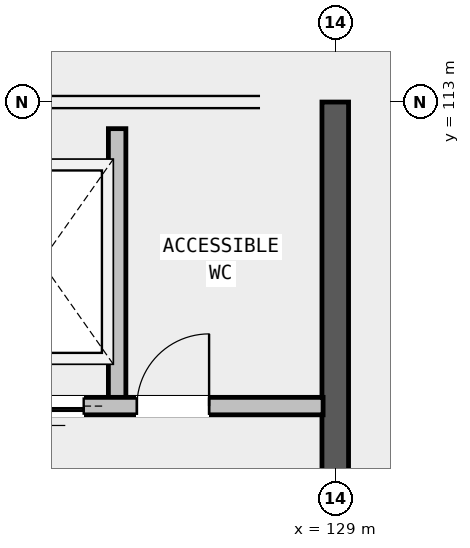
"""IFC4 building model, lengths in metres.
Left out: names, types, materials, properties, quantities, classifications, styles, units other than length and angle.
Written with IfcOpenShell. Run it as: python <this file> out.ifc"""

import sys

from ifc_helpers import new_model, si_unit, direction, frame, frame_2d, origin, place, context, subcontext, project, spatial, rectangle, extrude, element, fill, save


model = new_model("IFC4")
c1 = context("Model", 3, precision=1e-05, world=origin(), true_north=direction((0.0, 1.0)))
c2 = subcontext(c1, "Body", "Model", "MODEL_VIEW")
j1 = project(units=[si_unit("LENGTHUNIT", "METRE"), si_unit("PLANEANGLEUNIT", "RADIAN")], contexts=[c1])
p1 = place(None, origin())
s1 = spatial("IfcSite", under=j1, at=p1, CompositionType="ELEMENT")
p2 = place(p1, origin())
s2 = spatial("IfcBuilding", under=s1, at=p2, CompositionType="ELEMENT")
p3 = place(p2, frame((0.0, 0.0, 25.1)))
s3 = spatial("IfcBuildingStorey", under=s2, at=p3, CompositionType="ELEMENT", Elevation=25.1)
p4 = place(p3, frame((129.0, 104.0, 0.0), z_axis=(0.0, 0.0, 1.0), x_axis=(0.0, 1.0, 0.0)))
e1 = element("IfcWall", 1, at=p4, inside=s3, PredefinedType="SHEAR", context=c2, shape_type="SweptSolid", body=[
    extrude(rectangle(XDim=9.0, YDim=0.35, at=frame_2d((4.5, 0.0))), origin(), (0.0, 0.0, 1.0), 2.38),
])
p5 = place(p4, frame((1.4, 0.0, 0.0)))
e2 = element("IfcOpeningElement", 2, at=p5, cuts=e1, PredefinedType="OPENING", context=c2, shape_type="SweptSolid", body=[
    extrude(rectangle(XDim=1.9, YDim=2.3, at=frame_2d((0.95, 1.15))), frame((0.0, 0.185, 0.0), z_axis=(0.0, -1.0, 0.0), x_axis=(1.0, 0.0, 0.0)), (0.0, 0.0, 1.0), 0.37),
])
p6 = place(p3, frame((126.13, 109.0, 0.0), z_axis=(0.0, 0.0, 1.0), x_axis=(0.0, 1.0, 0.0)))
e3 = element("IfcWall", 3, at=p6, inside=s3, PredefinedType="PARTITIONING", context=c2, shape_type="SweptSolid", body=[
    extrude(rectangle(XDim=3.65, YDim=0.23, at=frame_2d((1.825, 0.0))), origin(), (0.0, 0.0, 1.0), 2.38),
])
p7 = place(p3, frame((124.21, 109.0, 0.0), z_axis=(0.0, 0.0, 1.0), x_axis=(1.0, 0.0, 0.0)))
e4 = element("IfcWall", 4, at=p7, inside=s3, PredefinedType="PARTITIONING", context=c2, shape_type="SweptSolid", body=[
    extrude(rectangle(XDim=4.63, YDim=0.23, at=frame_2d((2.315, 0.0))), origin(), (0.0, 0.0, 1.0), 2.38),
])
p8 = place(p7, frame((0.38, 0.0, 0.0)))
e5 = element("IfcOpeningElement", 5, at=p8, cuts=e4, PredefinedType="OPENING", context=c2, shape_type="SweptSolid", body=[
    extrude(rectangle(XDim=1.1, YDim=2.15, at=frame_2d((0.55, 1.075))), frame((0.0, 0.125, 0.0), z_axis=(0.0, -1.0, 0.0), x_axis=(1.0, 0.0, 0.0)), (0.0, 0.0, 1.0), 0.25),
])
p9 = place(p7, frame((2.18, 0.0, 0.0)))
e6 = element("IfcOpeningElement", 6, at=p9, cuts=e4, PredefinedType="OPENING", context=c2, shape_type="SweptSolid", body=[
    extrude(rectangle(XDim=0.95, YDim=2.1, at=frame_2d((0.475, 1.05))), frame((0.0, 0.125, 0.0), z_axis=(0.0, -1.0, 0.0), x_axis=(1.0, 0.0, 0.0)), (0.0, 0.0, 1.0), 0.25),
])
p10 = place(p8, origin())
e7 = element("IfcDoor", 7, at=p10, inside=s3, OperationType="SLIDING_TO_LEFT", PredefinedType="DOOR", context=c2, shape_type="SweptSolid", body=[
    extrude(rectangle(XDim=1.1, YDim=2.15, at=frame_2d((0.55, 1.075))), frame((0.0, 0.025, 0.0), z_axis=(0.0, -1.0, 0.0), x_axis=(1.0, 0.0, 0.0)), (0.0, 0.0, 1.0), 0.05),
])
fill(e5, e7)
p11 = place(p9, origin())
e8 = element("IfcDoor", 8, at=p11, inside=s3, OperationType="SINGLE_SWING_RIGHT", PredefinedType="DOOR", context=c2, shape_type="SweptSolid", body=[
    extrude(rectangle(XDim=0.95, YDim=2.1, at=frame_2d((0.475, 1.05))), frame((0.0, 0.025, 0.0), z_axis=(0.0, -1.0, 0.0), x_axis=(1.0, 0.0, 0.0)), (0.0, 0.0, 1.0), 0.05),
])
fill(e6, e8)
save(model, sys.argv[1])
